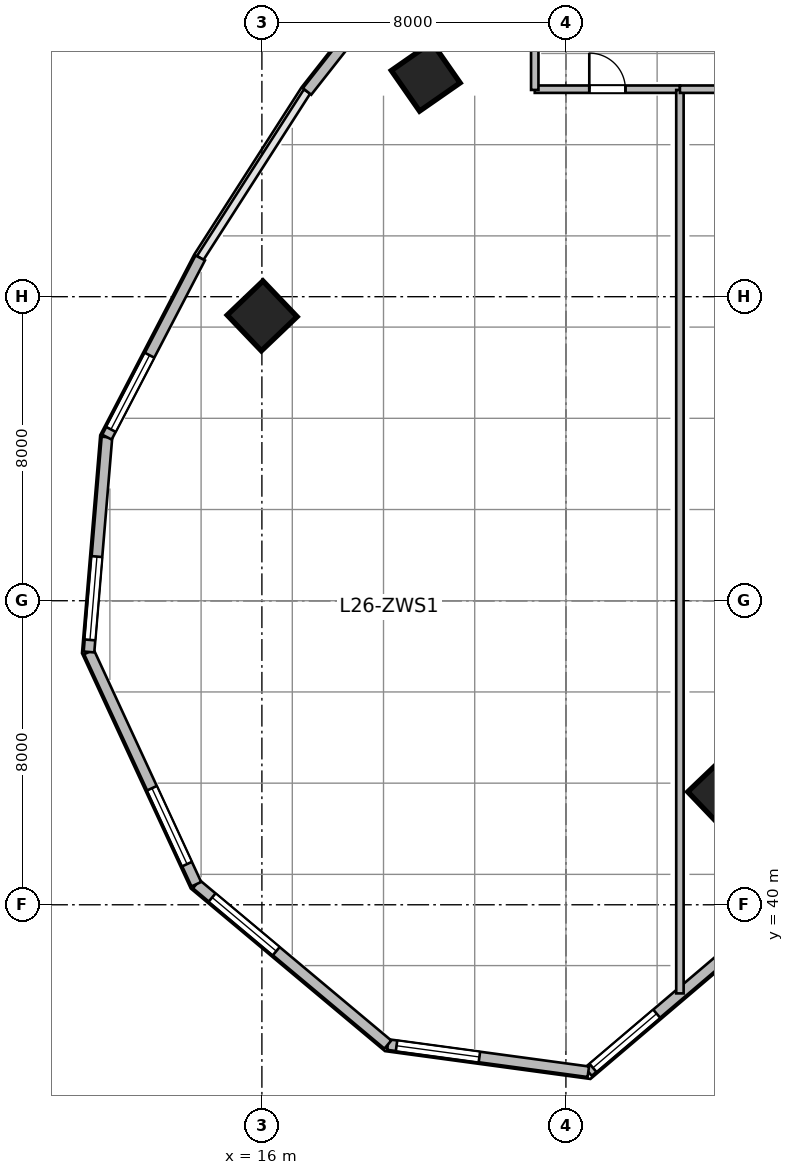
"""IFC4 building model, lengths in metres.
Left out: names, types, materials, properties, quantities, classifications, styles, units other than length and angle.
Written with IfcOpenShell. Run it as: python <this file> out.ifc"""

import sys

from ifc_helpers import new_model, si_unit, direction, frame, frame_2d, origin, origin_2d, place, context, subcontext, project, spatial, rectangle, extrude, source, transform, mapped, element, fill, save


model = new_model("IFC4")
c1 = context("Model", 3, precision=1e-05, world=origin(), true_north=direction((0.0, 1.0)))
c2 = subcontext(c1, "Body", "Model", "MODEL_VIEW")
j1 = project(units=[si_unit("LENGTHUNIT", "METRE"), si_unit("PLANEANGLEUNIT", "RADIAN")], contexts=[c1])
p1 = place(None, origin())
s1 = spatial("IfcSite", under=j1, at=p1, CompositionType="ELEMENT")
p2 = place(p1, origin())
s2 = spatial("IfcBuilding", under=s1, at=p2, CompositionType="ELEMENT")
p3 = place(p2, frame((0.0, 0.0, 111.6)))
s3 = spatial("IfcBuildingStorey", under=s2, at=p3, CompositionType="ELEMENT", Elevation=111.6)
m1 = source(origin(), c2, "Body", "SweptSolid", [
    extrude(rectangle(XDim=1.1, YDim=1.1, at=origin_2d()), origin(), (0.0, 0.0, 1.0), 3.9),
])
p4 = place(p3, frame((27.985, 42.955, 0.0), z_axis=(0.0, 0.0, 1.0), x_axis=(-0.690756218984, 0.723087716626, 0.0)))
e1 = element("IfcColumn", 1, at=p4, inside=s3, PredefinedType="COLUMN", context=c2, shape_type="MappedRepresentation", body=[
    mapped(m1, transform((0.0, 0.0, 0.0), scale=1.0)),
])
m2 = source(origin(), c2, "Body", "SweptSolid", [
    extrude(rectangle(XDim=1.3, YDim=1.3, at=origin_2d()), origin(), (0.0, 0.0, 1.0), 3.9),
])
for number, where, z_axis, x_axis in (
    (2, (16.007, 55.494, 0.0), (0.0, 0.0, 1.0), (-0.691, 0.723, 0.0)),
    (3, (20.311, 61.789, 0.0), (0.0, 0.0, 1.0), (-0.571, 0.821, 0.0)),
):
    element("IfcColumn", number, at=place(p3, frame(where, z_axis=z_axis, x_axis=x_axis)), inside=s3, PredefinedType="COLUMN", context=c2, shape_type="MappedRepresentation", body=[
        mapped(m2, transform((0.0, 0.0, 0.0), scale=1.0)),
    ])
m3 = source(origin(), c2, "Body", "SweptSolid", [
    extrude(rectangle(XDim=4.659, YDim=0.28, at=frame_2d((2.33, 0.0))), origin(), (0.0, 0.0, 1.0), 3.65),
])
p5 = place(p3, frame((28.139, 38.624, 0.0), z_axis=(0.0, 0.0, 1.0), x_axis=(-0.761913458795, -0.647678841176, 0.0)))
e4 = element("IfcWall", 4, at=p5, inside=s3, PredefinedType="SOLIDWALL", context=c2, shape_type="MappedRepresentation", body=[
    mapped(m3, transform((0.0, 0.0, 0.0), scale=1.0)),
])
p6 = place(p5, frame((2.299, 0.0, 0.95)))
e5 = element("IfcOpeningElement", 5, at=p6, cuts=e4, PredefinedType="OPENING", context=c2, shape_type="SweptSolid", body=[
    extrude(rectangle(XDim=2.2, YDim=2.1, at=frame_2d((1.1, 1.05))), frame((0.0, 0.15, 0.0), z_axis=(0.0, -1.0, 0.0), x_axis=(1.0, 0.0, 0.0)), (0.0, 0.0, 1.0), 0.3),
])
m4 = source(origin(), c2, "Body", "SweptSolid", [
    extrude(rectangle(XDim=5.324, YDim=0.28, at=frame_2d((2.662, 0.0))), origin(), (0.0, 0.0, 1.0), 3.65),
])
p7 = place(p3, frame((24.59, 35.606, 0.0), z_axis=(0.0, 0.0, 1.0), x_axis=(-0.990931467223, 0.134368252451, 0.0)))
e6 = element("IfcWall", 6, at=p7, inside=s3, PredefinedType="SOLIDWALL", context=c2, shape_type="MappedRepresentation", body=[
    mapped(m4, transform((0.0, 0.0, 0.0), scale=1.0)),
])
p8 = place(p7, frame((2.893, 0.0, 0.95)))
e7 = element("IfcOpeningElement", 7, at=p8, cuts=e6, PredefinedType="OPENING", context=c2, shape_type="SweptSolid", body=[
    extrude(rectangle(XDim=2.2, YDim=2.1, at=frame_2d((1.1, 1.05))), frame((0.0, 0.15, 0.0), z_axis=(0.0, -1.0, 0.0), x_axis=(1.0, 0.0, 0.0)), (0.0, 0.0, 1.0), 0.3),
])
m5 = source(origin(), c2, "Body", "SweptSolid", [
    extrude(rectangle(XDim=6.573, YDim=0.28, at=frame_2d((3.287, 0.0))), origin(), (0.0, 0.0, 1.0), 3.65),
])
p9 = place(p3, frame((19.314, 36.322, 0.0), z_axis=(0.0, 0.0, 1.0), x_axis=(-0.766715154163, 0.641987439423, 0.0)))
e8 = element("IfcWall", 8, at=p9, inside=s3, PredefinedType="SOLIDWALL", context=c2, shape_type="MappedRepresentation", body=[
    mapped(m5, transform((0.0, 0.0, 0.0), scale=1.0)),
])
p10 = place(p9, frame((3.83, 0.0, 0.95)))
e9 = element("IfcOpeningElement", 9, at=p10, cuts=e8, PredefinedType="OPENING", context=c2, shape_type="SweptSolid", body=[
    extrude(rectangle(XDim=2.2, YDim=2.1, at=frame_2d((1.1, 1.05))), frame((0.0, 0.15, 0.0), z_axis=(0.0, -1.0, 0.0), x_axis=(1.0, 0.0, 0.0)), (0.0, 0.0, 1.0), 0.3),
])
m6 = source(origin(), c2, "Body", "SweptSolid", [
    extrude(rectangle(XDim=6.732, YDim=0.28, at=frame_2d((3.366, 0.0))), origin(), (0.0, 0.0, 1.0), 3.65),
])
p11 = place(p3, frame((14.275, 40.541, 0.0), z_axis=(0.0, 0.0, 1.0), x_axis=(-0.419644552709, 0.907688520023, 0.0)))
e10 = element("IfcWall", 10, at=p11, inside=s3, PredefinedType="SOLIDWALL", context=c2, shape_type="MappedRepresentation", body=[
    mapped(m6, transform((0.0, 0.0, 0.0), scale=1.0)),
])
p12 = place(p11, frame((0.583, 0.0, 0.95)))
e11 = element("IfcOpeningElement", 11, at=p12, cuts=e10, PredefinedType="OPENING", context=c2, shape_type="SweptSolid", body=[
    extrude(rectangle(XDim=2.2, YDim=2.1, at=frame_2d((1.1, 1.05))), frame((0.0, 0.15, 0.0), z_axis=(0.0, -1.0, 0.0), x_axis=(1.0, 0.0, 0.0)), (0.0, 0.0, 1.0), 0.3),
])
m7 = source(origin(), c2, "Body", "SweptSolid", [
    extrude(rectangle(XDim=5.674, YDim=0.28, at=frame_2d((2.837, 0.0))), origin(), (0.0, 0.0, 1.0), 3.65),
])
p13 = place(p3, frame((11.45, 46.652, 0.0), z_axis=(0.0, 0.0, 1.0), x_axis=(0.083309007867, 0.996523762491, 0.0)))
e12 = element("IfcWall", 12, at=p13, inside=s3, PredefinedType="SOLIDWALL", context=c2, shape_type="MappedRepresentation", body=[
    mapped(m7, transform((0.0, 0.0, 0.0), scale=1.0)),
])
p14 = place(p13, frame((0.318, 0.0, 0.95)))
e13 = element("IfcOpeningElement", 13, at=p14, cuts=e12, PredefinedType="OPENING", context=c2, shape_type="SweptSolid", body=[
    extrude(rectangle(XDim=2.2, YDim=2.1, at=frame_2d((1.1, 1.05))), frame((0.0, 0.15, 0.0), z_axis=(0.0, -1.0, 0.0), x_axis=(1.0, 0.0, 0.0)), (0.0, 0.0, 1.0), 0.3),
])
m8 = source(origin(), c2, "Body", "SweptSolid", [
    extrude(rectangle(XDim=5.315, YDim=0.28, at=frame_2d((2.658, 0.0))), origin(), (0.0, 0.0, 1.0), 3.65),
])
p15 = place(p3, frame((11.922, 52.305, 0.0), z_axis=(0.0, 0.0, 1.0), x_axis=(0.461760527822, 0.887004630735, 0.0)))
e14 = element("IfcWall", 14, at=p15, inside=s3, PredefinedType="SOLIDWALL", context=c2, shape_type="MappedRepresentation", body=[
    mapped(m8, transform((0.0, 0.0, 0.0), scale=1.0)),
])
p16 = place(p15, frame((0.229, 0.0, 0.95)))
e15 = element("IfcOpeningElement", 15, at=p16, cuts=e14, PredefinedType="OPENING", context=c2, shape_type="SweptSolid", body=[
    extrude(rectangle(XDim=2.2, YDim=2.1, at=frame_2d((1.1, 1.05))), frame((0.0, 0.15, 0.0), z_axis=(0.0, -1.0, 0.0), x_axis=(1.0, 0.0, 0.0)), (0.0, 0.0, 1.0), 0.3),
])
m9 = source(origin(), c2, "Body", "SweptSolid", [
    extrude(rectangle(XDim=5.058, YDim=0.28, at=frame_2d((2.529, 0.0))), origin(), (0.0, 0.0, 1.0), 3.65),
])
p17 = place(p3, frame((17.188, 61.4, 0.0), z_axis=(0.0, 0.0, 1.0), x_axis=(0.618145507434, 0.786063694391, 0.0)))
e16 = element("IfcWall", 16, at=p17, inside=s3, PredefinedType="SOLIDWALL", context=c2, shape_type="MappedRepresentation", body=[
    mapped(m9, transform((0.0, 0.0, 0.0), scale=1.0)),
])
m10 = source(origin(), c2, "Body", "SweptSolid", [
    extrude(rectangle(XDim=3.82, YDim=0.195, at=frame_2d((1.91, 0.0))), origin(), (0.0, 0.0, 1.0), 3.65),
])
p18 = place(p3, frame((23.18, 61.46, 0.0), z_axis=(0.0, 0.0, 1.0), x_axis=(1.0, 0.0, 0.0)))
e17 = element("IfcWall", 17, at=p18, inside=s3, PredefinedType="PARTITIONING", context=c2, shape_type="MappedRepresentation", body=[
    mapped(m10, transform((0.0, 0.0, 0.0), scale=1.0)),
])
p19 = place(p18, frame((1.435, 0.0, 0.0)))
e18 = element("IfcOpeningElement", 18, at=p19, cuts=e17, PredefinedType="OPENING", context=c2, shape_type="SweptSolid", body=[
    extrude(rectangle(XDim=0.95, YDim=2.1, at=frame_2d((0.475, 1.05))), frame((0.0, 0.107, 0.0), z_axis=(0.0, -1.0, 0.0), x_axis=(1.0, 0.0, 0.0)), (0.0, 0.0, 1.0), 0.215),
])
m11 = source(origin(), c2, "Body", "SweptSolid", [
    extrude(rectangle(XDim=23.771, YDim=0.195, at=frame_2d((11.886, 0.0))), origin(), (0.0, 0.0, 1.0), 2.942),
])
p20 = place(p3, frame((27.0, 37.668, 0.0), z_axis=(0.0, 0.0, 1.0), x_axis=(0.0, 1.0, 0.0)))
e19 = element("IfcWall", 19, at=p20, inside=s3, PredefinedType="PARTITIONING", context=c2, shape_type="MappedRepresentation", body=[
    mapped(m11, transform((0.0, 0.0, 0.0), scale=1.0)),
])
m12 = source(origin(), c2, "Body", "SweptSolid", [
    extrude(rectangle(XDim=7.4, YDim=0.195, at=frame_2d((3.7, 0.0))), origin(), (0.0, 0.0, 1.0), 3.65),
])
p21 = place(p3, frame((27.0, 61.46, 0.0), z_axis=(0.0, 0.0, 1.0), x_axis=(1.0, 0.0, 0.0)))
e20 = element("IfcWall", 20, at=p21, inside=s3, PredefinedType="PARTITIONING", context=c2, shape_type="MappedRepresentation", body=[
    mapped(m12, transform((0.0, 0.0, 0.0), scale=1.0)),
])
p22 = place(p21, frame((3.225, 0.0, 0.0)))
e21 = element("IfcOpeningElement", 21, at=p22, cuts=e20, PredefinedType="OPENING", context=c2, shape_type="SweptSolid", body=[
    extrude(rectangle(XDim=0.95, YDim=2.1, at=frame_2d((0.475, 1.05))), frame((0.0, 0.107, 0.0), z_axis=(0.0, -1.0, 0.0), x_axis=(1.0, 0.0, 0.0)), (0.0, 0.0, 1.0), 0.215),
])
m13 = source(origin(), c2, "Body", "SweptSolid", [
    extrude(rectangle(XDim=2.62, YDim=0.195, at=frame_2d((1.31, 0.0))), origin(), (0.0, 0.0, 1.0), 3.65),
])
p23 = place(p3, frame((23.18, 61.44, 0.0), z_axis=(0.0, 0.0, 1.0), x_axis=(0.0, 1.0, 0.0)))
e22 = element("IfcWall", 22, at=p23, inside=s3, PredefinedType="PARTITIONING", context=c2, shape_type="MappedRepresentation", body=[
    mapped(m13, transform((0.0, 0.0, 0.0), scale=1.0)),
])
m14 = source(origin(), c2, "Body", "SweptSolid", [
    extrude(rectangle(XDim=2.2, YDim=2.1, at=frame_2d((1.1, 1.05))), frame((0.0, 0.03, 0.0), z_axis=(0.0, -1.0, 0.0), x_axis=(1.0, 0.0, 0.0)), (0.0, 0.0, 1.0), 0.06),
])
p24 = place(p6, origin())
e23 = element("IfcWindow", 23, at=p24, inside=s3, PartitioningType="TRIPLE_PANEL_VERTICAL", PredefinedType="WINDOW", context=c2, shape_type="MappedRepresentation", body=[
    mapped(m14, transform((0.0, 0.0, 0.0), scale=1.0)),
])
fill(e5, e23)
p25 = place(p8, origin())
e24 = element("IfcWindow", 24, at=p25, inside=s3, PartitioningType="TRIPLE_PANEL_VERTICAL", PredefinedType="WINDOW", context=c2, shape_type="MappedRepresentation", body=[
    mapped(m14, transform((0.0, 0.0, 0.0), scale=1.0)),
])
fill(e7, e24)
p26 = place(p10, origin())
e25 = element("IfcWindow", 25, at=p26, inside=s3, PartitioningType="TRIPLE_PANEL_VERTICAL", PredefinedType="WINDOW", context=c2, shape_type="MappedRepresentation", body=[
    mapped(m14, transform((0.0, 0.0, 0.0), scale=1.0)),
])
fill(e9, e25)
p27 = place(p12, origin())
e26 = element("IfcWindow", 26, at=p27, inside=s3, PartitioningType="TRIPLE_PANEL_VERTICAL", PredefinedType="WINDOW", context=c2, shape_type="MappedRepresentation", body=[
    mapped(m14, transform((0.0, 0.0, 0.0), scale=1.0)),
])
fill(e11, e26)
p28 = place(p14, origin())
e27 = element("IfcWindow", 27, at=p28, inside=s3, PartitioningType="TRIPLE_PANEL_VERTICAL", PredefinedType="WINDOW", context=c2, shape_type="MappedRepresentation", body=[
    mapped(m14, transform((0.0, 0.0, 0.0), scale=1.0)),
])
fill(e13, e27)
p29 = place(p16, origin())
e28 = element("IfcWindow", 28, at=p29, inside=s3, PartitioningType="TRIPLE_PANEL_VERTICAL", PredefinedType="WINDOW", context=c2, shape_type="MappedRepresentation", body=[
    mapped(m14, transform((0.0, 0.0, 0.0), scale=1.0)),
])
fill(e15, e28)
m15 = source(origin(), c2, "Body", "SweptSolid", [
    extrude(rectangle(XDim=0.95, YDim=2.1, at=frame_2d((0.475, 1.05))), frame((0.0, 0.025, 0.0), z_axis=(0.0, -1.0, 0.0), x_axis=(1.0, 0.0, 0.0)), (0.0, 0.0, 1.0), 0.05),
])
p30 = place(p19, origin())
e29 = element("IfcDoor", 29, at=p30, inside=s3, OperationType="SINGLE_SWING_LEFT", PredefinedType="DOOR", context=c2, shape_type="MappedRepresentation", body=[
    mapped(m15, transform((0.0, 0.0, 0.0), scale=1.0)),
])
fill(e18, e29)
save(model, sys.argv[1])
